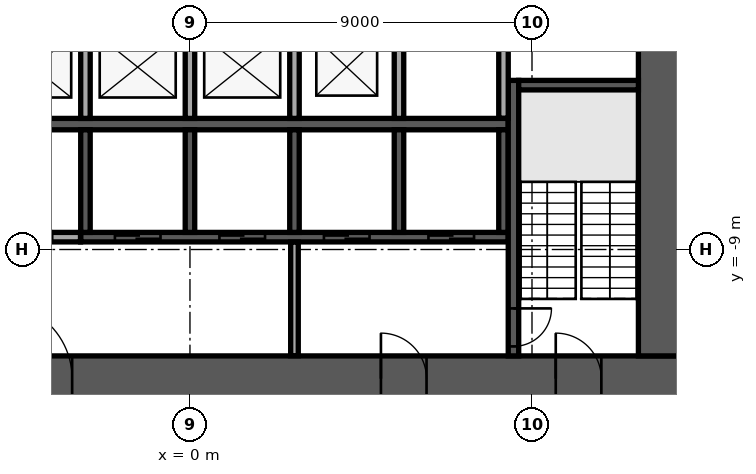
"""IFC4 building model, lengths in metres.
Left out: names, types, materials, properties, quantities, classifications, styles, units other than length and angle.
Written with IfcOpenShell. Run it as: python <this file> out.ifc"""

import sys

from ifc_helpers import new_model, si_unit, direction, frame, frame_2d, origin, place, context, subcontext, project, spatial, rectangle, extrude, element, fill, save


model = new_model("IFC4")
c1 = context("Model", 3, precision=1e-05, world=origin(), true_north=direction((0.0, 1.0)))
c2 = subcontext(c1, "Body", "Model", "MODEL_VIEW")
j1 = project(units=[si_unit("LENGTHUNIT", "METRE"), si_unit("PLANEANGLEUNIT", "RADIAN")], contexts=[c1])
p1 = place(None, origin())
s1 = spatial("IfcSite", under=j1, at=p1, CompositionType="ELEMENT")
p2 = place(p1, origin())
s2 = spatial("IfcBuilding", under=s1, at=p2, CompositionType="ELEMENT")
p3 = place(p2, origin())
s3 = spatial("IfcBuildingStorey", under=s2, at=p3, CompositionType="ELEMENT", Elevation=0.0)
p4 = place(p3, frame((-13.0, -12.4, 0.0), z_axis=(0.0, 0.0, 1.0), x_axis=(1.0, 0.0, 0.0)))
e1 = element("IfcWall", 1, at=p4, inside=s3, PredefinedType="SHEAR", context=c2, shape_type="SweptSolid", body=[
    extrude(rectangle(XDim=26.0, YDim=1.2, at=frame_2d((13.0, 0.0))), origin(), (0.0, 0.0, 1.0), 4.1),
])
p5 = place(p4, frame((7.9, 0.0, 0.0)))
e2 = element("IfcOpeningElement", 2, at=p5, cuts=e1, PredefinedType="OPENING", context=c2, shape_type="SweptSolid", body=[
    extrude(rectangle(XDim=2.0, YDim=2.1, at=frame_2d((1.0, 1.05))), frame((0.0, 0.61, 0.0), z_axis=(0.0, -1.0, 0.0), x_axis=(1.0, 0.0, 0.0)), (0.0, 0.0, 1.0), 1.22),
])
p6 = place(p4, frame((18.025, 0.0, 0.0)))
e3 = element("IfcOpeningElement", 3, at=p6, cuts=e1, PredefinedType="OPENING", context=c2, shape_type="SweptSolid", body=[
    extrude(rectangle(XDim=1.2, YDim=2.1, at=frame_2d((0.6, 1.05))), frame((0.0, 0.61, 0.0), z_axis=(0.0, -1.0, 0.0), x_axis=(1.0, 0.0, 0.0)), (0.0, 0.0, 1.0), 1.22),
])
p7 = place(p4, frame((2.175, 0.0, 0.0)))
e4 = element("IfcOpeningElement", 4, at=p7, cuts=e1, PredefinedType="OPENING", context=c2, shape_type="SweptSolid", body=[
    extrude(rectangle(XDim=1.2, YDim=2.1, at=frame_2d((0.6, 1.05))), frame((0.0, 0.61, 0.0), z_axis=(0.0, -1.0, 0.0), x_axis=(1.0, 0.0, 0.0)), (0.0, 0.0, 1.0), 1.22),
])
p8 = place(p4, frame((22.625, 0.0, 0.0)))
e5 = element("IfcOpeningElement", 5, at=p8, cuts=e1, PredefinedType="OPENING", context=c2, shape_type="SweptSolid", body=[
    extrude(rectangle(XDim=1.2, YDim=2.1, at=frame_2d((0.6, 1.05))), frame((0.0, 0.61, 0.0), z_axis=(0.0, -1.0, 0.0), x_axis=(1.0, 0.0, 0.0)), (0.0, 0.0, 1.0), 1.22),
])
p9 = place(p3, frame((12.4, -11.8, 0.0), z_axis=(0.0, 0.0, 1.0), x_axis=(0.0, 1.0, 0.0)))
e6 = element("IfcWall", 6, at=p9, inside=s3, PredefinedType="SHEAR", context=c2, shape_type="SweptSolid", body=[
    extrude(rectangle(XDim=23.6, YDim=1.2, at=frame_2d((11.8, 0.0))), origin(), (0.0, 0.0, 1.0), 4.1),
])
p10 = place(p9, frame((10.6, 0.0, 0.0)))
e7 = element("IfcOpeningElement", 7, at=p10, cuts=e6, PredefinedType="OPENING", context=c2, shape_type="SweptSolid", body=[
    extrude(rectangle(XDim=2.4, YDim=2.4, at=frame_2d((1.2, 1.2))), frame((0.0, 0.61, 0.0), z_axis=(0.0, -1.0, 0.0), x_axis=(1.0, 0.0, 0.0)), (0.0, 0.0, 1.0), 1.22),
])
p11 = place(p3, frame((-8.375, -5.7, 0.0), z_axis=(0.0, 0.0, 1.0), x_axis=(1.0, 0.0, 0.0)))
e8 = element("IfcWall", 8, at=p11, inside=s3, PredefinedType="SOLIDWALL", context=c2, shape_type="SweptSolid", body=[
    extrude(rectangle(XDim=16.75, YDim=0.3, at=frame_2d((8.375, 0.0))), origin(), (0.0, 0.0, 1.0), 4.1),
])
for number, where, z_axis, x_axis in (
    (9, (-2.75, -5.55, 0.0), (0.0, 0.0, 1.0), (0.0, 1.0, 0.0)),
    (10, (0.0, -5.55, 0.0), (0.0, 0.0, 1.0), (0.0, 1.0, 0.0)),
    (11, (2.75, -5.55, 0.0), (0.0, 0.0, 1.0), (0.0, 1.0, 0.0)),
    (12, (5.5, -5.55, 0.0), (0.0, 0.0, 1.0), (0.0, 1.0, 0.0)),
):
    element("IfcWall", number, at=place(p3, frame(where, z_axis=z_axis, x_axis=x_axis)), inside=s3, PredefinedType="SOLIDWALL", context=c2, shape_type="SweptSolid", body=[
        extrude(rectangle(XDim=2.7, YDim=0.25, at=frame_2d((1.35, 0.0))), origin(), (0.0, 0.0, 1.0), 4.1),
    ])
p12 = place(p3, frame((-2.875, -8.675, 0.0), z_axis=(0.0, 0.0, 1.0), x_axis=(1.0, 0.0, 0.0)))
e13 = element("IfcWall", 13, at=p12, inside=s3, PredefinedType="SOLIDWALL", context=c2, shape_type="SweptSolid", body=[
    extrude(rectangle(XDim=11.25, YDim=0.25, at=frame_2d((5.625, 0.0))), origin(), (0.0, 0.0, 1.0), 4.1),
])
p13 = place(p12, frame((0.9, 0.0, 0.0)))
e14 = element("IfcOpeningElement", 14, at=p13, cuts=e13, PredefinedType="OPENING", context=c2, shape_type="SweptSolid", body=[
    extrude(rectangle(XDim=1.2, YDim=2.1, at=frame_2d((0.6, 1.05))), frame((0.0, 0.135, 0.0), z_axis=(0.0, -1.0, 0.0), x_axis=(1.0, 0.0, 0.0)), (0.0, 0.0, 1.0), 0.27),
])
p14 = place(p12, frame((3.65, 0.0, 0.0)))
e15 = element("IfcOpeningElement", 15, at=p14, cuts=e13, PredefinedType="OPENING", context=c2, shape_type="SweptSolid", body=[
    extrude(rectangle(XDim=1.2, YDim=2.1, at=frame_2d((0.6, 1.05))), frame((0.0, 0.135, 0.0), z_axis=(0.0, -1.0, 0.0), x_axis=(1.0, 0.0, 0.0)), (0.0, 0.0, 1.0), 0.27),
])
p15 = place(p12, frame((6.4, 0.0, 0.0)))
e16 = element("IfcOpeningElement", 16, at=p15, cuts=e13, PredefinedType="OPENING", context=c2, shape_type="SweptSolid", body=[
    extrude(rectangle(XDim=1.2, YDim=2.1, at=frame_2d((0.6, 1.05))), frame((0.0, 0.135, 0.0), z_axis=(0.0, -1.0, 0.0), x_axis=(1.0, 0.0, 0.0)), (0.0, 0.0, 1.0), 0.27),
])
p16 = place(p12, frame((9.15, 0.0, 0.0)))
e17 = element("IfcOpeningElement", 17, at=p16, cuts=e13, PredefinedType="OPENING", context=c2, shape_type="SweptSolid", body=[
    extrude(rectangle(XDim=1.2, YDim=2.1, at=frame_2d((0.6, 1.05))), frame((0.0, 0.135, 0.0), z_axis=(0.0, -1.0, 0.0), x_axis=(1.0, 0.0, 0.0)), (0.0, 0.0, 1.0), 0.27),
])
for number, where, z_axis, x_axis in (
    (18, (-2.75, -8.55, 0.0), (0.0, 0.0, 1.0), (0.0, 1.0, 0.0)),
    (19, (0.0, -8.55, 0.0), (0.0, 0.0, 1.0), (0.0, 1.0, 0.0)),
    (20, (2.75, -8.55, 0.0), (0.0, 0.0, 1.0), (0.0, 1.0, 0.0)),
    (21, (5.5, -8.55, 0.0), (0.0, 0.0, 1.0), (0.0, 1.0, 0.0)),
    (22, (8.25, -8.55, 0.0), (0.0, 0.0, 1.0), (0.0, 1.0, 0.0)),
):
    element("IfcWall", number, at=place(p3, frame(where, z_axis=z_axis, x_axis=x_axis)), inside=s3, PredefinedType="SOLIDWALL", context=c2, shape_type="SweptSolid", body=[
        extrude(rectangle(XDim=2.7, YDim=0.25, at=frame_2d((1.35, 0.0))), origin(), (0.0, 0.0, 1.0), 4.1),
    ])
p17 = place(p3, frame((8.512, -4.55, 0.0), z_axis=(0.0, 0.0, 1.0), x_axis=(0.0, -1.0, 0.0)))
e23 = element("IfcWall", 23, at=p17, inside=s3, PredefinedType="SOLIDWALL", context=c2, shape_type="SweptSolid", body=[
    extrude(rectangle(XDim=7.25, YDim=0.275, at=frame_2d((3.625, 0.0))), origin(), (0.0, 0.0, 1.0), 4.1),
])
p18 = place(p17, frame((6.0, 0.0, 0.0)))
e24 = element("IfcOpeningElement", 24, at=p18, cuts=e23, PredefinedType="OPENING", context=c2, shape_type="SweptSolid", body=[
    extrude(rectangle(XDim=1.0, YDim=2.1, at=frame_2d((0.5, 1.05))), frame((0.0, 0.147, 0.0), z_axis=(0.0, -1.0, 0.0), x_axis=(1.0, 0.0, 0.0)), (0.0, 0.0, 1.0), 0.295),
])
p19 = place(p3, frame((8.65, -4.675, 0.0), z_axis=(0.0, 0.0, 1.0), x_axis=(1.0, 0.0, 0.0)))
e25 = element("IfcWall", 25, at=p19, inside=s3, PredefinedType="SOLIDWALL", context=c2, shape_type="SweptSolid", body=[
    extrude(rectangle(XDim=3.15, YDim=0.25, at=frame_2d((1.575, 0.0))), origin(), (0.0, 0.0, 1.0), 4.1),
])
p20 = place(p3, frame((2.75, -11.795, 0.0), z_axis=(0.0, 0.0, 1.0), x_axis=(0.0, 1.0, 0.0)))
e26 = element("IfcWall", 26, at=p20, inside=s3, PredefinedType="PARTITIONING", context=c2, shape_type="SweptSolid", body=[
    extrude(rectangle(XDim=2.99, YDim=0.2, at=frame_2d((1.495, 0.0))), origin(), (0.0, 0.0, 1.0), 4.1),
])
p21 = place(p3, frame((-8.37, -8.675, 0.0), z_axis=(0.0, 0.0, 1.0), x_axis=(1.0, 0.0, 0.0)))
e27 = element("IfcWall", 27, at=p21, inside=s3, PredefinedType="PARTITIONING", context=c2, shape_type="SweptSolid", body=[
    extrude(rectangle(XDim=5.49, YDim=0.25, at=frame_2d((2.745, 0.0))), origin(), (0.0, 0.0, 1.0), 4.1),
])
p22 = place(p21, frame((0.995, 0.0, 0.0)))
e28 = element("IfcOpeningElement", 28, at=p22, cuts=e27, PredefinedType="OPENING", context=c2, shape_type="SweptSolid", body=[
    extrude(rectangle(XDim=1.0, YDim=2.1, at=frame_2d((0.5, 1.05))), frame((0.0, 0.135, 0.0), z_axis=(0.0, -1.0, 0.0), x_axis=(1.0, 0.0, 0.0)), (0.0, 0.0, 1.0), 0.27),
])
p23 = place(p21, frame((3.745, 0.0, 0.0)))
e29 = element("IfcOpeningElement", 29, at=p23, cuts=e27, PredefinedType="OPENING", context=c2, shape_type="SweptSolid", body=[
    extrude(rectangle(XDim=1.0, YDim=2.1, at=frame_2d((0.5, 1.05))), frame((0.0, 0.135, 0.0), z_axis=(0.0, -1.0, 0.0), x_axis=(1.0, 0.0, 0.0)), (0.0, 0.0, 1.0), 0.27),
])
p24 = place(p3, frame((8.25, -5.545, 0.0), z_axis=(0.0, 0.0, 1.0), x_axis=(0.0, 1.0, 0.0)))
e30 = element("IfcWall", 30, at=p24, inside=s3, PredefinedType="PARTITIONING", context=c2, shape_type="SweptSolid", body=[
    extrude(rectangle(XDim=2.69, YDim=0.25, at=frame_2d((1.345, 0.0))), origin(), (0.0, 0.0, 1.0), 4.1),
])
p25 = place(p5, origin())
e31 = element("IfcDoor", 31, at=p25, inside=s3, OperationType="SINGLE_SWING_LEFT", PredefinedType="DOOR", context=c2, shape_type="SweptSolid", body=[
    extrude(rectangle(XDim=2.0, YDim=2.1, at=frame_2d((1.0, 1.05))), frame((0.0, 0.025, 0.0), z_axis=(0.0, -1.0, 0.0), x_axis=(1.0, 0.0, 0.0)), (0.0, 0.0, 1.0), 0.05),
])
fill(e2, e31)
p26 = place(p6, origin())
e32 = element("IfcDoor", 32, at=p26, inside=s3, OperationType="SINGLE_SWING_LEFT", PredefinedType="DOOR", context=c2, shape_type="SweptSolid", body=[
    extrude(rectangle(XDim=1.2, YDim=2.1, at=frame_2d((0.6, 1.05))), frame((0.0, 0.025, 0.0), z_axis=(0.0, -1.0, 0.0), x_axis=(1.0, 0.0, 0.0)), (0.0, 0.0, 1.0), 0.05),
])
fill(e3, e32)
p27 = place(p8, origin())
e33 = element("IfcDoor", 33, at=p27, inside=s3, OperationType="SINGLE_SWING_LEFT", PredefinedType="DOOR", context=c2, shape_type="SweptSolid", body=[
    extrude(rectangle(XDim=1.2, YDim=2.1, at=frame_2d((0.6, 1.05))), frame((0.0, 0.025, 0.0), z_axis=(0.0, -1.0, 0.0), x_axis=(1.0, 0.0, 0.0)), (0.0, 0.0, 1.0), 0.05),
])
fill(e5, e33)
p28 = place(p13, origin())
e34 = element("IfcDoor", 34, at=p28, inside=s3, OperationType="DOUBLE_DOOR_SLIDING", PredefinedType="DOOR", context=c2, shape_type="SweptSolid", body=[
    extrude(rectangle(XDim=1.2, YDim=2.1, at=frame_2d((0.6, 1.05))), frame((0.0, 0.025, 0.0), z_axis=(0.0, -1.0, 0.0), x_axis=(1.0, 0.0, 0.0)), (0.0, 0.0, 1.0), 0.05),
])
fill(e14, e34)
p29 = place(p14, origin())
e35 = element("IfcDoor", 35, at=p29, inside=s3, OperationType="DOUBLE_DOOR_SLIDING", PredefinedType="DOOR", context=c2, shape_type="SweptSolid", body=[
    extrude(rectangle(XDim=1.2, YDim=2.1, at=frame_2d((0.6, 1.05))), frame((0.0, 0.025, 0.0), z_axis=(0.0, -1.0, 0.0), x_axis=(1.0, 0.0, 0.0)), (0.0, 0.0, 1.0), 0.05),
])
fill(e15, e35)
p30 = place(p15, origin())
e36 = element("IfcDoor", 36, at=p30, inside=s3, OperationType="DOUBLE_DOOR_SLIDING", PredefinedType="DOOR", context=c2, shape_type="SweptSolid", body=[
    extrude(rectangle(XDim=1.2, YDim=2.1, at=frame_2d((0.6, 1.05))), frame((0.0, 0.025, 0.0), z_axis=(0.0, -1.0, 0.0), x_axis=(1.0, 0.0, 0.0)), (0.0, 0.0, 1.0), 0.05),
])
fill(e16, e36)
p31 = place(p16, origin())
e37 = element("IfcDoor", 37, at=p31, inside=s3, OperationType="DOUBLE_DOOR_SLIDING", PredefinedType="DOOR", context=c2, shape_type="SweptSolid", body=[
    extrude(rectangle(XDim=1.2, YDim=2.1, at=frame_2d((0.6, 1.05))), frame((0.0, 0.025, 0.0), z_axis=(0.0, -1.0, 0.0), x_axis=(1.0, 0.0, 0.0)), (0.0, 0.0, 1.0), 0.05),
])
fill(e17, e37)
p32 = place(p18, origin())
e38 = element("IfcDoor", 38, at=p32, inside=s3, OperationType="SINGLE_SWING_LEFT", PredefinedType="DOOR", context=c2, shape_type="SweptSolid", body=[
    extrude(rectangle(XDim=1.0, YDim=2.1, at=frame_2d((0.5, 1.05))), frame((0.0, 0.025, 0.0), z_axis=(0.0, -1.0, 0.0), x_axis=(1.0, 0.0, 0.0)), (0.0, 0.0, 1.0), 0.05),
])
fill(e24, e38)
save(model, sys.argv[1])
